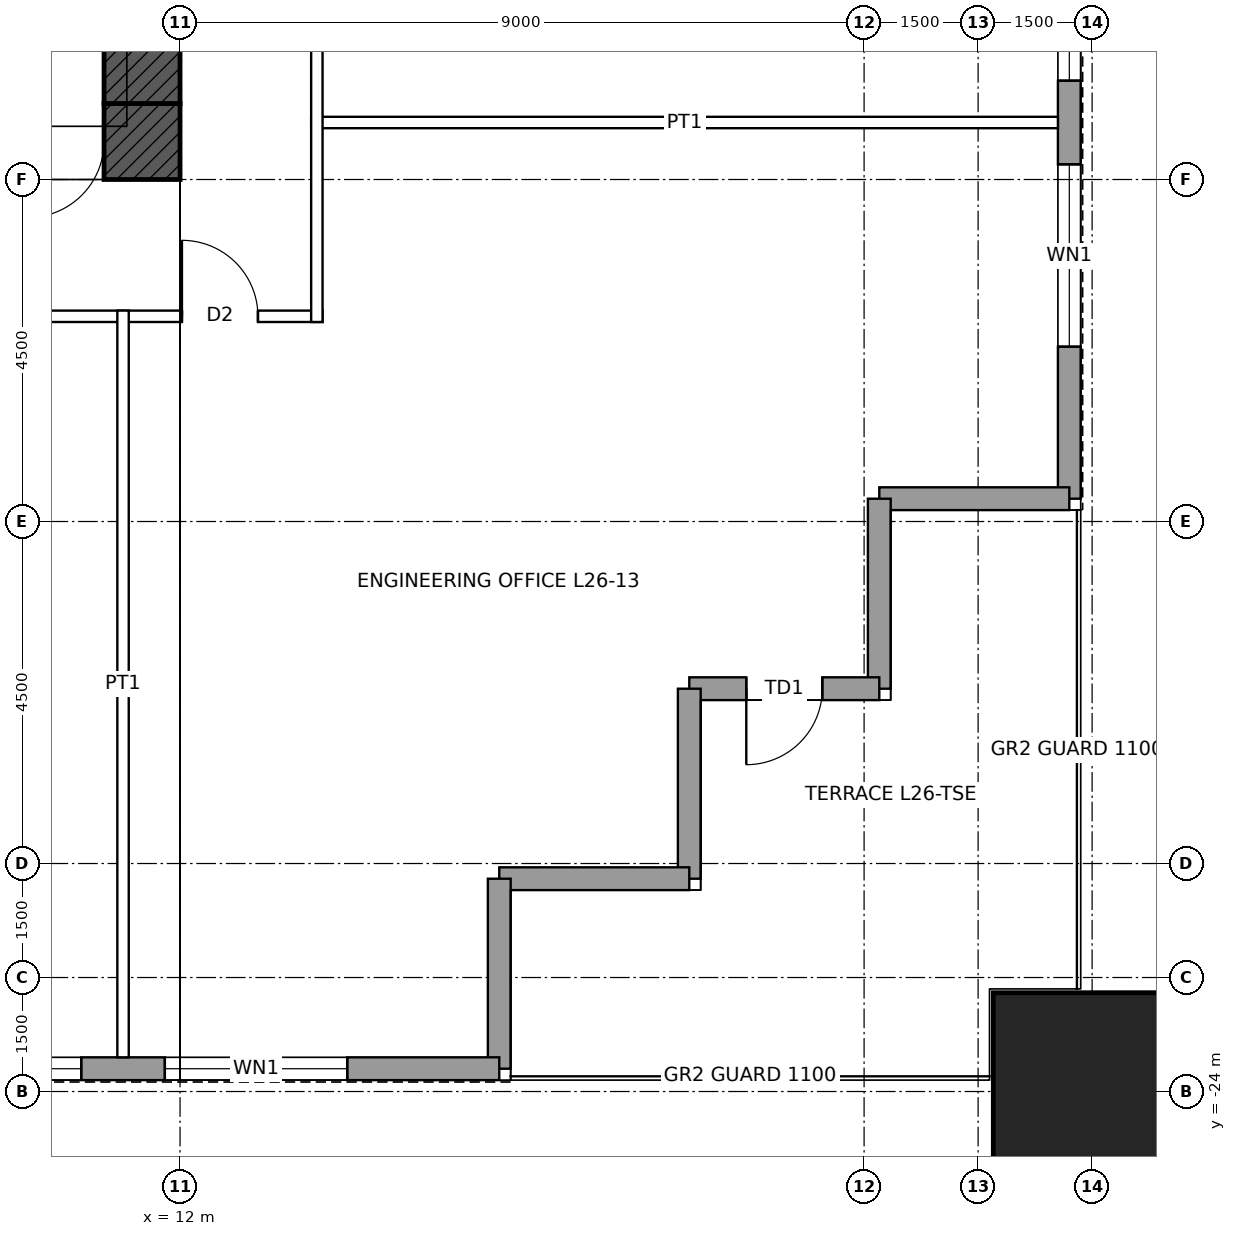
"""IFC4 building model, lengths in metres.
Left out: names, types, materials, properties, quantities, classifications, styles, units other than length and angle.
Written with IfcOpenShell. Run it as: python <this file> out.ifc"""

import sys

from ifc_helpers import new_model, si_unit, direction, frame, frame_2d, origin, origin_2d, place, context, subcontext, project, spatial, rectangle, hollow_rectangle, extrude, element, fill, save


model = new_model("IFC4")
c1 = context("Model", 3, precision=1e-05, world=origin(), true_north=direction((0.0, 1.0)))
c2 = subcontext(c1, "Body", "Model", "MODEL_VIEW")
j1 = project(units=[si_unit("LENGTHUNIT", "METRE"), si_unit("PLANEANGLEUNIT", "RADIAN")], contexts=[c1])
p1 = place(None, origin())
s1 = spatial("IfcSite", under=j1, at=p1, CompositionType="ELEMENT")
p2 = place(p1, origin())
s2 = spatial("IfcBuilding", under=s1, at=p2, CompositionType="ELEMENT")
p3 = place(p2, frame((0.0, 0.0, 131.4)))
s3 = spatial("IfcBuildingStorey", under=s2, at=p3, CompositionType="ELEMENT", Elevation=131.4)
p4 = place(p3, frame((24.0, -24.0, 0.0), z_axis=(0.0, 0.0, 1.0), x_axis=(1.0, 0.0, 0.0)))
e1 = element("IfcColumn", 1, at=p4, inside=s3, PredefinedType="COLUMN", context=c2, shape_type="SweptSolid", body=[
    extrude(hollow_rectangle(XDim=2.6, YDim=2.6, WallThickness=0.13, at=origin_2d()), origin(), (0.0, 0.0, 1.0), 4.5),
])
p5 = place(p3, frame((12.0, -11.5, 0.0), z_axis=(0.0, 0.0, 1.0), x_axis=(-1.0, 0.0, 0.0)))
e2 = element("IfcWall", 2, at=p5, inside=s3, PredefinedType="SHEAR", context=c2, shape_type="SweptSolid", body=[
    extrude(rectangle(XDim=24.0, YDim=1.0, at=frame_2d((12.0, 0.0))), origin(), (0.0, 0.0, 1.0), 4.5),
])
p6 = place(p5, frame((11.5, 0.0, 0.0)))
e3 = element("IfcOpeningElement", 3, at=p6, cuts=e2, PredefinedType="OPENING", context=c2, shape_type="SweptSolid", body=[
    extrude(rectangle(XDim=1.0, YDim=2.1, at=frame_2d((0.5, 1.05))), frame((0.0, 0.51, 0.0), z_axis=(0.0, -1.0, 0.0), x_axis=(1.0, 0.0, 0.0)), (0.0, 0.0, 1.0), 1.02),
])
p7 = place(p5, frame((1.0, 0.0, 0.0)))
e4 = element("IfcOpeningElement", 4, at=p7, cuts=e2, PredefinedType="OPENING", context=c2, shape_type="SweptSolid", body=[
    extrude(rectangle(XDim=1.0, YDim=2.4, at=frame_2d((0.5, 1.2))), frame((0.0, 0.51, 0.0), z_axis=(0.0, -1.0, 0.0), x_axis=(1.0, 0.0, 0.0)), (0.0, 0.0, 1.0), 1.02),
])
p8 = place(p3, frame((11.5, 11.0, 0.0), z_axis=(0.0, 0.0, 1.0), x_axis=(0.0, -1.0, 0.0)))
e5 = element("IfcWall", 5, at=p8, inside=s3, PredefinedType="SHEAR", context=c2, shape_type="SweptSolid", body=[
    extrude(rectangle(XDim=22.0, YDim=1.0, at=frame_2d((11.0, 0.0))), origin(), (0.0, 0.0, 1.0), 4.5),
])
p9 = place(p8, frame((10.5, 0.0, 0.0)))
e6 = element("IfcOpeningElement", 6, at=p9, cuts=e5, PredefinedType="OPENING", context=c2, shape_type="SweptSolid", body=[
    extrude(rectangle(XDim=1.0, YDim=2.4, at=frame_2d((0.5, 1.2))), frame((0.0, 0.51, 0.0), z_axis=(0.0, -1.0, 0.0), x_axis=(1.0, 0.0, 0.0)), (0.0, 0.0, 1.0), 1.02),
])
p10 = place(p3, frame((23.7, 16.2, 0.0), z_axis=(0.0, 0.0, 1.0), x_axis=(0.0, -1.0, 0.0)))
e7 = element("IfcWall", 7, at=p10, inside=s3, PredefinedType="SOLIDWALL", context=c2, shape_type="SweptSolid", body=[
    extrude(rectangle(XDim=32.4, YDim=0.3, at=frame_2d((16.2, 0.0))), origin(), (0.0, 0.0, 1.0), 4.3),
])
p11 = place(p10, frame((2.0, 0.0, 1.0)))
e8 = element("IfcOpeningElement", 8, at=p11, cuts=e7, PredefinedType="OPENING", context=c2, shape_type="SweptSolid", body=[
    extrude(rectangle(XDim=2.4, YDim=1.2, at=frame_2d((1.2, 0.6))), frame((0.0, 0.16, 0.0), z_axis=(0.0, -1.0, 0.0), x_axis=(1.0, 0.0, 0.0)), (0.0, 0.0, 1.0), 0.32),
])
p12 = place(p10, frame((5.5, 0.0, 1.0)))
e9 = element("IfcOpeningElement", 9, at=p12, cuts=e7, PredefinedType="OPENING", context=c2, shape_type="SweptSolid", body=[
    extrude(rectangle(XDim=2.4, YDim=1.2, at=frame_2d((1.2, 0.6))), frame((0.0, 0.16, 0.0), z_axis=(0.0, -1.0, 0.0), x_axis=(1.0, 0.0, 0.0)), (0.0, 0.0, 1.0), 0.32),
])
p13 = place(p10, frame((9.5, 0.0, 1.0)))
e10 = element("IfcOpeningElement", 10, at=p13, cuts=e7, PredefinedType="OPENING", context=c2, shape_type="SweptSolid", body=[
    extrude(rectangle(XDim=2.4, YDim=1.2, at=frame_2d((1.2, 0.6))), frame((0.0, 0.16, 0.0), z_axis=(0.0, -1.0, 0.0), x_axis=(1.0, 0.0, 0.0)), (0.0, 0.0, 1.0), 0.32),
])
p14 = place(p10, frame((13.0, 0.0, 1.0)))
e11 = element("IfcOpeningElement", 11, at=p14, cuts=e7, PredefinedType="OPENING", context=c2, shape_type="SweptSolid", body=[
    extrude(rectangle(XDim=2.4, YDim=1.2, at=frame_2d((1.2, 0.6))), frame((0.0, 0.16, 0.0), z_axis=(0.0, -1.0, 0.0), x_axis=(1.0, 0.0, 0.0)), (0.0, 0.0, 1.0), 0.32),
])
p15 = place(p10, frame((17.0, 0.0, 1.0)))
e12 = element("IfcOpeningElement", 12, at=p15, cuts=e7, PredefinedType="OPENING", context=c2, shape_type="SweptSolid", body=[
    extrude(rectangle(XDim=2.4, YDim=1.2, at=frame_2d((1.2, 0.6))), frame((0.0, 0.16, 0.0), z_axis=(0.0, -1.0, 0.0), x_axis=(1.0, 0.0, 0.0)), (0.0, 0.0, 1.0), 0.32),
])
p16 = place(p10, frame((20.5, 0.0, 1.0)))
e13 = element("IfcOpeningElement", 13, at=p16, cuts=e7, PredefinedType="OPENING", context=c2, shape_type="SweptSolid", body=[
    extrude(rectangle(XDim=2.4, YDim=1.2, at=frame_2d((1.2, 0.6))), frame((0.0, 0.16, 0.0), z_axis=(0.0, -1.0, 0.0), x_axis=(1.0, 0.0, 0.0)), (0.0, 0.0, 1.0), 0.32),
])
p17 = place(p10, frame((24.5, 0.0, 1.0)))
e14 = element("IfcOpeningElement", 14, at=p17, cuts=e7, PredefinedType="OPENING", context=c2, shape_type="SweptSolid", body=[
    extrude(rectangle(XDim=2.4, YDim=1.2, at=frame_2d((1.2, 0.6))), frame((0.0, 0.16, 0.0), z_axis=(0.0, -1.0, 0.0), x_axis=(1.0, 0.0, 0.0)), (0.0, 0.0, 1.0), 0.32),
])
p18 = place(p10, frame((28.0, 0.0, 1.0)))
e15 = element("IfcOpeningElement", 15, at=p18, cuts=e7, PredefinedType="OPENING", context=c2, shape_type="SweptSolid", body=[
    extrude(rectangle(XDim=2.4, YDim=1.2, at=frame_2d((1.2, 0.6))), frame((0.0, 0.16, 0.0), z_axis=(0.0, -1.0, 0.0), x_axis=(1.0, 0.0, 0.0)), (0.0, 0.0, 1.0), 0.32),
])
for number, where, z_axis, x_axis in (
    (16, (23.7, -16.2, 0.0), (0.0, 0.0, 1.0), (-1.0, 0.0, 0.0)),
    (17, (21.2, -16.2, 0.0), (0.0, 0.0, 1.0), (0.0, -1.0, 0.0)),
):
    element("IfcWall", number, at=place(p3, frame(where, z_axis=z_axis, x_axis=x_axis)), inside=s3, PredefinedType="SOLIDWALL", context=c2, shape_type="SweptSolid", body=[
        extrude(rectangle(XDim=2.5, YDim=0.3, at=frame_2d((1.25, 0.0))), origin(), (0.0, 0.0, 1.0), 4.3),
    ])
p19 = place(p3, frame((21.2, -18.7, 0.0), z_axis=(0.0, 0.0, 1.0), x_axis=(-1.0, 0.0, 0.0)))
e18 = element("IfcWall", 18, at=p19, inside=s3, PredefinedType="SOLIDWALL", context=c2, shape_type="SweptSolid", body=[
    extrude(rectangle(XDim=2.5, YDim=0.3, at=frame_2d((1.25, 0.0))), origin(), (0.0, 0.0, 1.0), 4.3),
])
p20 = place(p19, frame((0.75, 0.0, 0.0)))
e19 = element("IfcOpeningElement", 19, at=p20, cuts=e18, PredefinedType="OPENING", context=c2, shape_type="SweptSolid", body=[
    extrude(rectangle(XDim=1.0, YDim=2.4, at=frame_2d((0.5, 1.2))), frame((0.0, 0.16, 0.0), z_axis=(0.0, -1.0, 0.0), x_axis=(1.0, 0.0, 0.0)), (0.0, 0.0, 1.0), 0.32),
])
for number, where, z_axis, x_axis in (
    (20, (18.7, -18.7, 0.0), (0.0, 0.0, 1.0), (0.0, -1.0, 0.0)),
    (21, (18.7, -21.2, 0.0), (0.0, 0.0, 1.0), (-1.0, 0.0, 0.0)),
    (22, (16.2, -21.2, 0.0), (0.0, 0.0, 1.0), (0.0, -1.0, 0.0)),
):
    element("IfcWall", number, at=place(p3, frame(where, z_axis=z_axis, x_axis=x_axis)), inside=s3, PredefinedType="SOLIDWALL", context=c2, shape_type="SweptSolid", body=[
        extrude(rectangle(XDim=2.5, YDim=0.3, at=frame_2d((1.25, 0.0))), origin(), (0.0, 0.0, 1.0), 4.3),
    ])
p21 = place(p3, frame((16.2, -23.7, 0.0), z_axis=(0.0, 0.0, 1.0), x_axis=(-1.0, 0.0, 0.0)))
e23 = element("IfcWall", 23, at=p21, inside=s3, PredefinedType="SOLIDWALL", context=c2, shape_type="SweptSolid", body=[
    extrude(rectangle(XDim=32.4, YDim=0.3, at=frame_2d((16.2, 0.0))), origin(), (0.0, 0.0, 1.0), 4.3),
])
p22 = place(p21, frame((2.0, 0.0, 1.0)))
e24 = element("IfcOpeningElement", 24, at=p22, cuts=e23, PredefinedType="OPENING", context=c2, shape_type="SweptSolid", body=[
    extrude(rectangle(XDim=2.4, YDim=1.2, at=frame_2d((1.2, 0.6))), frame((0.0, 0.16, 0.0), z_axis=(0.0, -1.0, 0.0), x_axis=(1.0, 0.0, 0.0)), (0.0, 0.0, 1.0), 0.32),
])
p23 = place(p21, frame((5.5, 0.0, 1.0)))
e25 = element("IfcOpeningElement", 25, at=p23, cuts=e23, PredefinedType="OPENING", context=c2, shape_type="SweptSolid", body=[
    extrude(rectangle(XDim=2.4, YDim=1.2, at=frame_2d((1.2, 0.6))), frame((0.0, 0.16, 0.0), z_axis=(0.0, -1.0, 0.0), x_axis=(1.0, 0.0, 0.0)), (0.0, 0.0, 1.0), 0.32),
])
p24 = place(p21, frame((9.5, 0.0, 1.0)))
e26 = element("IfcOpeningElement", 26, at=p24, cuts=e23, PredefinedType="OPENING", context=c2, shape_type="SweptSolid", body=[
    extrude(rectangle(XDim=2.4, YDim=1.2, at=frame_2d((1.2, 0.6))), frame((0.0, 0.16, 0.0), z_axis=(0.0, -1.0, 0.0), x_axis=(1.0, 0.0, 0.0)), (0.0, 0.0, 1.0), 0.32),
])
p25 = place(p21, frame((13.0, 0.0, 1.0)))
e27 = element("IfcOpeningElement", 27, at=p25, cuts=e23, PredefinedType="OPENING", context=c2, shape_type="SweptSolid", body=[
    extrude(rectangle(XDim=2.4, YDim=1.2, at=frame_2d((1.2, 0.6))), frame((0.0, 0.16, 0.0), z_axis=(0.0, -1.0, 0.0), x_axis=(1.0, 0.0, 0.0)), (0.0, 0.0, 1.0), 0.32),
])
p26 = place(p21, frame((17.0, 0.0, 1.0)))
e28 = element("IfcOpeningElement", 28, at=p26, cuts=e23, PredefinedType="OPENING", context=c2, shape_type="SweptSolid", body=[
    extrude(rectangle(XDim=2.4, YDim=1.2, at=frame_2d((1.2, 0.6))), frame((0.0, 0.16, 0.0), z_axis=(0.0, -1.0, 0.0), x_axis=(1.0, 0.0, 0.0)), (0.0, 0.0, 1.0), 0.32),
])
p27 = place(p21, frame((20.5, 0.0, 1.0)))
e29 = element("IfcOpeningElement", 29, at=p27, cuts=e23, PredefinedType="OPENING", context=c2, shape_type="SweptSolid", body=[
    extrude(rectangle(XDim=2.4, YDim=1.2, at=frame_2d((1.2, 0.6))), frame((0.0, 0.16, 0.0), z_axis=(0.0, -1.0, 0.0), x_axis=(1.0, 0.0, 0.0)), (0.0, 0.0, 1.0), 0.32),
])
p28 = place(p21, frame((24.5, 0.0, 1.0)))
e30 = element("IfcOpeningElement", 30, at=p28, cuts=e23, PredefinedType="OPENING", context=c2, shape_type="SweptSolid", body=[
    extrude(rectangle(XDim=2.4, YDim=1.2, at=frame_2d((1.2, 0.6))), frame((0.0, 0.16, 0.0), z_axis=(0.0, -1.0, 0.0), x_axis=(1.0, 0.0, 0.0)), (0.0, 0.0, 1.0), 0.32),
])
p29 = place(p21, frame((28.0, 0.0, 1.0)))
e31 = element("IfcOpeningElement", 31, at=p29, cuts=e23, PredefinedType="OPENING", context=c2, shape_type="SweptSolid", body=[
    extrude(rectangle(XDim=2.4, YDim=1.2, at=frame_2d((1.2, 0.6))), frame((0.0, 0.16, 0.0), z_axis=(0.0, -1.0, 0.0), x_axis=(1.0, 0.0, 0.0)), (0.0, 0.0, 1.0), 0.32),
])
p30 = place(p3, frame((-13.875, -13.8, 0.0), z_axis=(0.0, 0.0, 1.0), x_axis=(1.0, 0.0, 0.0)))
e32 = element("IfcWall", 32, at=p30, inside=s3, PredefinedType="PARTITIONING", context=c2, shape_type="SweptSolid", body=[
    extrude(rectangle(XDim=27.75, YDim=0.15, at=frame_2d((13.875, 0.0))), origin(), (0.0, 0.0, 1.0), 4.3),
])
p31 = place(p30, frame((20.475, 0.0, 0.0)))
e33 = element("IfcOpeningElement", 33, at=p31, cuts=e32, PredefinedType="OPENING", context=c2, shape_type="SweptSolid", body=[
    extrude(rectangle(XDim=1.8, YDim=2.4, at=frame_2d((0.9, 1.2))), frame((0.0, 0.085, 0.0), z_axis=(0.0, -1.0, 0.0), x_axis=(1.0, 0.0, 0.0)), (0.0, 0.0, 1.0), 0.17),
])
p32 = place(p30, frame((10.525, 0.0, 0.0)))
e34 = element("IfcOpeningElement", 34, at=p32, cuts=e32, PredefinedType="OPENING", context=c2, shape_type="SweptSolid", body=[
    extrude(rectangle(XDim=1.8, YDim=2.4, at=frame_2d((0.9, 1.2))), frame((0.0, 0.085, 0.0), z_axis=(0.0, -1.0, 0.0), x_axis=(1.0, 0.0, 0.0)), (0.0, 0.0, 1.0), 0.17),
])
p33 = place(p30, frame((5.475, 0.0, 0.0)))
e35 = element("IfcOpeningElement", 35, at=p33, cuts=e32, PredefinedType="OPENING", context=c2, shape_type="SweptSolid", body=[
    extrude(rectangle(XDim=1.8, YDim=2.4, at=frame_2d((0.9, 1.2))), frame((0.0, 0.085, 0.0), z_axis=(0.0, -1.0, 0.0), x_axis=(1.0, 0.0, 0.0)), (0.0, 0.0, 1.0), 0.17),
])
p34 = place(p30, frame((25.9, 0.0, 0.0)))
e36 = element("IfcOpeningElement", 36, at=p34, cuts=e32, PredefinedType="OPENING", context=c2, shape_type="SweptSolid", body=[
    extrude(rectangle(XDim=1.0, YDim=2.1, at=frame_2d((0.5, 1.05))), frame((0.0, 0.085, 0.0), z_axis=(0.0, -1.0, 0.0), x_axis=(1.0, 0.0, 0.0)), (0.0, 0.0, 1.0), 0.17),
])
p35 = place(p30, frame((0.85, 0.0, 0.0)))
e37 = element("IfcOpeningElement", 37, at=p35, cuts=e32, PredefinedType="OPENING", context=c2, shape_type="SweptSolid", body=[
    extrude(rectangle(XDim=1.0, YDim=2.1, at=frame_2d((0.5, 1.05))), frame((0.0, 0.085, 0.0), z_axis=(0.0, -1.0, 0.0), x_axis=(1.0, 0.0, 0.0)), (0.0, 0.0, 1.0), 0.17),
])
for number, where, z_axis, x_axis in (
    (38, (13.725, -11.25, 0.0), (0.0, 0.0, 1.0), (1.0, 0.0, 0.0)),
    (39, (11.25, -23.55, 0.0), (0.0, 0.0, 1.0), (0.0, 1.0, 0.0)),
):
    element("IfcWall", number, at=place(p3, frame(where, z_axis=z_axis, x_axis=x_axis)), inside=s3, PredefinedType="PARTITIONING", context=c2, shape_type="SweptSolid", body=[
        extrude(rectangle(XDim=9.825, YDim=0.15, at=frame_2d((4.913, 0.0))), origin(), (0.0, 0.0, 1.0), 3.431),
    ])
p36 = place(p3, frame((13.8, -13.875, 0.0), z_axis=(0.0, 0.0, 1.0), x_axis=(0.0, 1.0, 0.0)))
e40 = element("IfcWall", 40, at=p36, inside=s3, PredefinedType="PARTITIONING", context=c2, shape_type="SweptSolid", body=[
    extrude(rectangle(XDim=27.75, YDim=0.15, at=frame_2d((13.875, 0.0))), origin(), (0.0, 0.0, 1.0), 4.3),
])
p37 = place(p36, frame((20.875, 0.0, 0.0)))
e41 = element("IfcOpeningElement", 41, at=p37, cuts=e40, PredefinedType="OPENING", context=c2, shape_type="SweptSolid", body=[
    extrude(rectangle(XDim=1.0, YDim=2.1, at=frame_2d((0.5, 1.05))), frame((0.0, 0.085, 0.0), z_axis=(0.0, -1.0, 0.0), x_axis=(1.0, 0.0, 0.0)), (0.0, 0.0, 1.0), 0.17),
])
p38 = place(p36, frame((9.225, 0.0, 0.0)))
e42 = element("IfcOpeningElement", 42, at=p38, cuts=e40, PredefinedType="OPENING", context=c2, shape_type="SweptSolid", body=[
    extrude(rectangle(XDim=1.8, YDim=2.4, at=frame_2d((0.9, 1.2))), frame((0.0, 0.085, 0.0), z_axis=(0.0, -1.0, 0.0), x_axis=(1.0, 0.0, 0.0)), (0.0, 0.0, 1.0), 0.17),
])
p39 = place(p17, origin())
e43 = element("IfcWindow", 43, at=p39, inside=s3, PartitioningType="SINGLE_PANEL", PredefinedType="WINDOW", context=c2, shape_type="SweptSolid", body=[
    extrude(rectangle(XDim=2.4, YDim=1.2, at=frame_2d((1.2, 0.6))), frame((0.0, 0.03, 0.0), z_axis=(0.0, -1.0, 0.0), x_axis=(1.0, 0.0, 0.0)), (0.0, 0.0, 1.0), 0.06),
])
fill(e14, e43)
p40 = place(p18, origin())
e44 = element("IfcWindow", 44, at=p40, inside=s3, PartitioningType="SINGLE_PANEL", PredefinedType="WINDOW", context=c2, shape_type="SweptSolid", body=[
    extrude(rectangle(XDim=2.4, YDim=1.2, at=frame_2d((1.2, 0.6))), frame((0.0, 0.03, 0.0), z_axis=(0.0, -1.0, 0.0), x_axis=(1.0, 0.0, 0.0)), (0.0, 0.0, 1.0), 0.06),
])
fill(e15, e44)
p41 = place(p20, origin())
e45 = element("IfcDoor", 45, at=p41, inside=s3, OperationType="SINGLE_SWING_RIGHT", PredefinedType="DOOR", context=c2, shape_type="SweptSolid", body=[
    extrude(rectangle(XDim=1.0, YDim=2.4, at=frame_2d((0.5, 1.2))), frame((0.0, 0.025, 0.0), z_axis=(0.0, -1.0, 0.0), x_axis=(1.0, 0.0, 0.0)), (0.0, 0.0, 1.0), 0.05),
])
fill(e19, e45)
p42 = place(p22, origin())
e46 = element("IfcWindow", 46, at=p42, inside=s3, PartitioningType="SINGLE_PANEL", PredefinedType="WINDOW", context=c2, shape_type="SweptSolid", body=[
    extrude(rectangle(XDim=2.4, YDim=1.2, at=frame_2d((1.2, 0.6))), frame((0.0, 0.03, 0.0), z_axis=(0.0, -1.0, 0.0), x_axis=(1.0, 0.0, 0.0)), (0.0, 0.0, 1.0), 0.06),
])
fill(e24, e46)
p43 = place(p23, origin())
e47 = element("IfcWindow", 47, at=p43, inside=s3, PartitioningType="SINGLE_PANEL", PredefinedType="WINDOW", context=c2, shape_type="SweptSolid", body=[
    extrude(rectangle(XDim=2.4, YDim=1.2, at=frame_2d((1.2, 0.6))), frame((0.0, 0.03, 0.0), z_axis=(0.0, -1.0, 0.0), x_axis=(1.0, 0.0, 0.0)), (0.0, 0.0, 1.0), 0.06),
])
fill(e25, e47)
p44 = place(p7, origin())
e48 = element("IfcDoor", 48, at=p44, inside=s3, OperationType="SINGLE_SWING_RIGHT", PredefinedType="DOOR", context=c2, shape_type="SweptSolid", body=[
    extrude(rectangle(XDim=1.0, YDim=2.4, at=frame_2d((0.5, 1.2))), frame((0.0, 0.485, 0.0), z_axis=(0.0, -1.0, 0.0), x_axis=(1.0, 0.0, 0.0)), (0.0, 0.0, 1.0), 0.05),
])
fill(e4, e48)
p45 = place(p34, origin())
e49 = element("IfcDoor", 49, at=p45, inside=s3, OperationType="SINGLE_SWING_LEFT", PredefinedType="DOOR", context=c2, shape_type="SweptSolid", body=[
    extrude(rectangle(XDim=1.0, YDim=2.1, at=frame_2d((0.5, 1.05))), frame((0.0, 0.025, 0.0), z_axis=(0.0, -1.0, 0.0), x_axis=(1.0, 0.0, 0.0)), (0.0, 0.0, 1.0), 0.05),
])
fill(e36, e49)
save(model, sys.argv[1])
